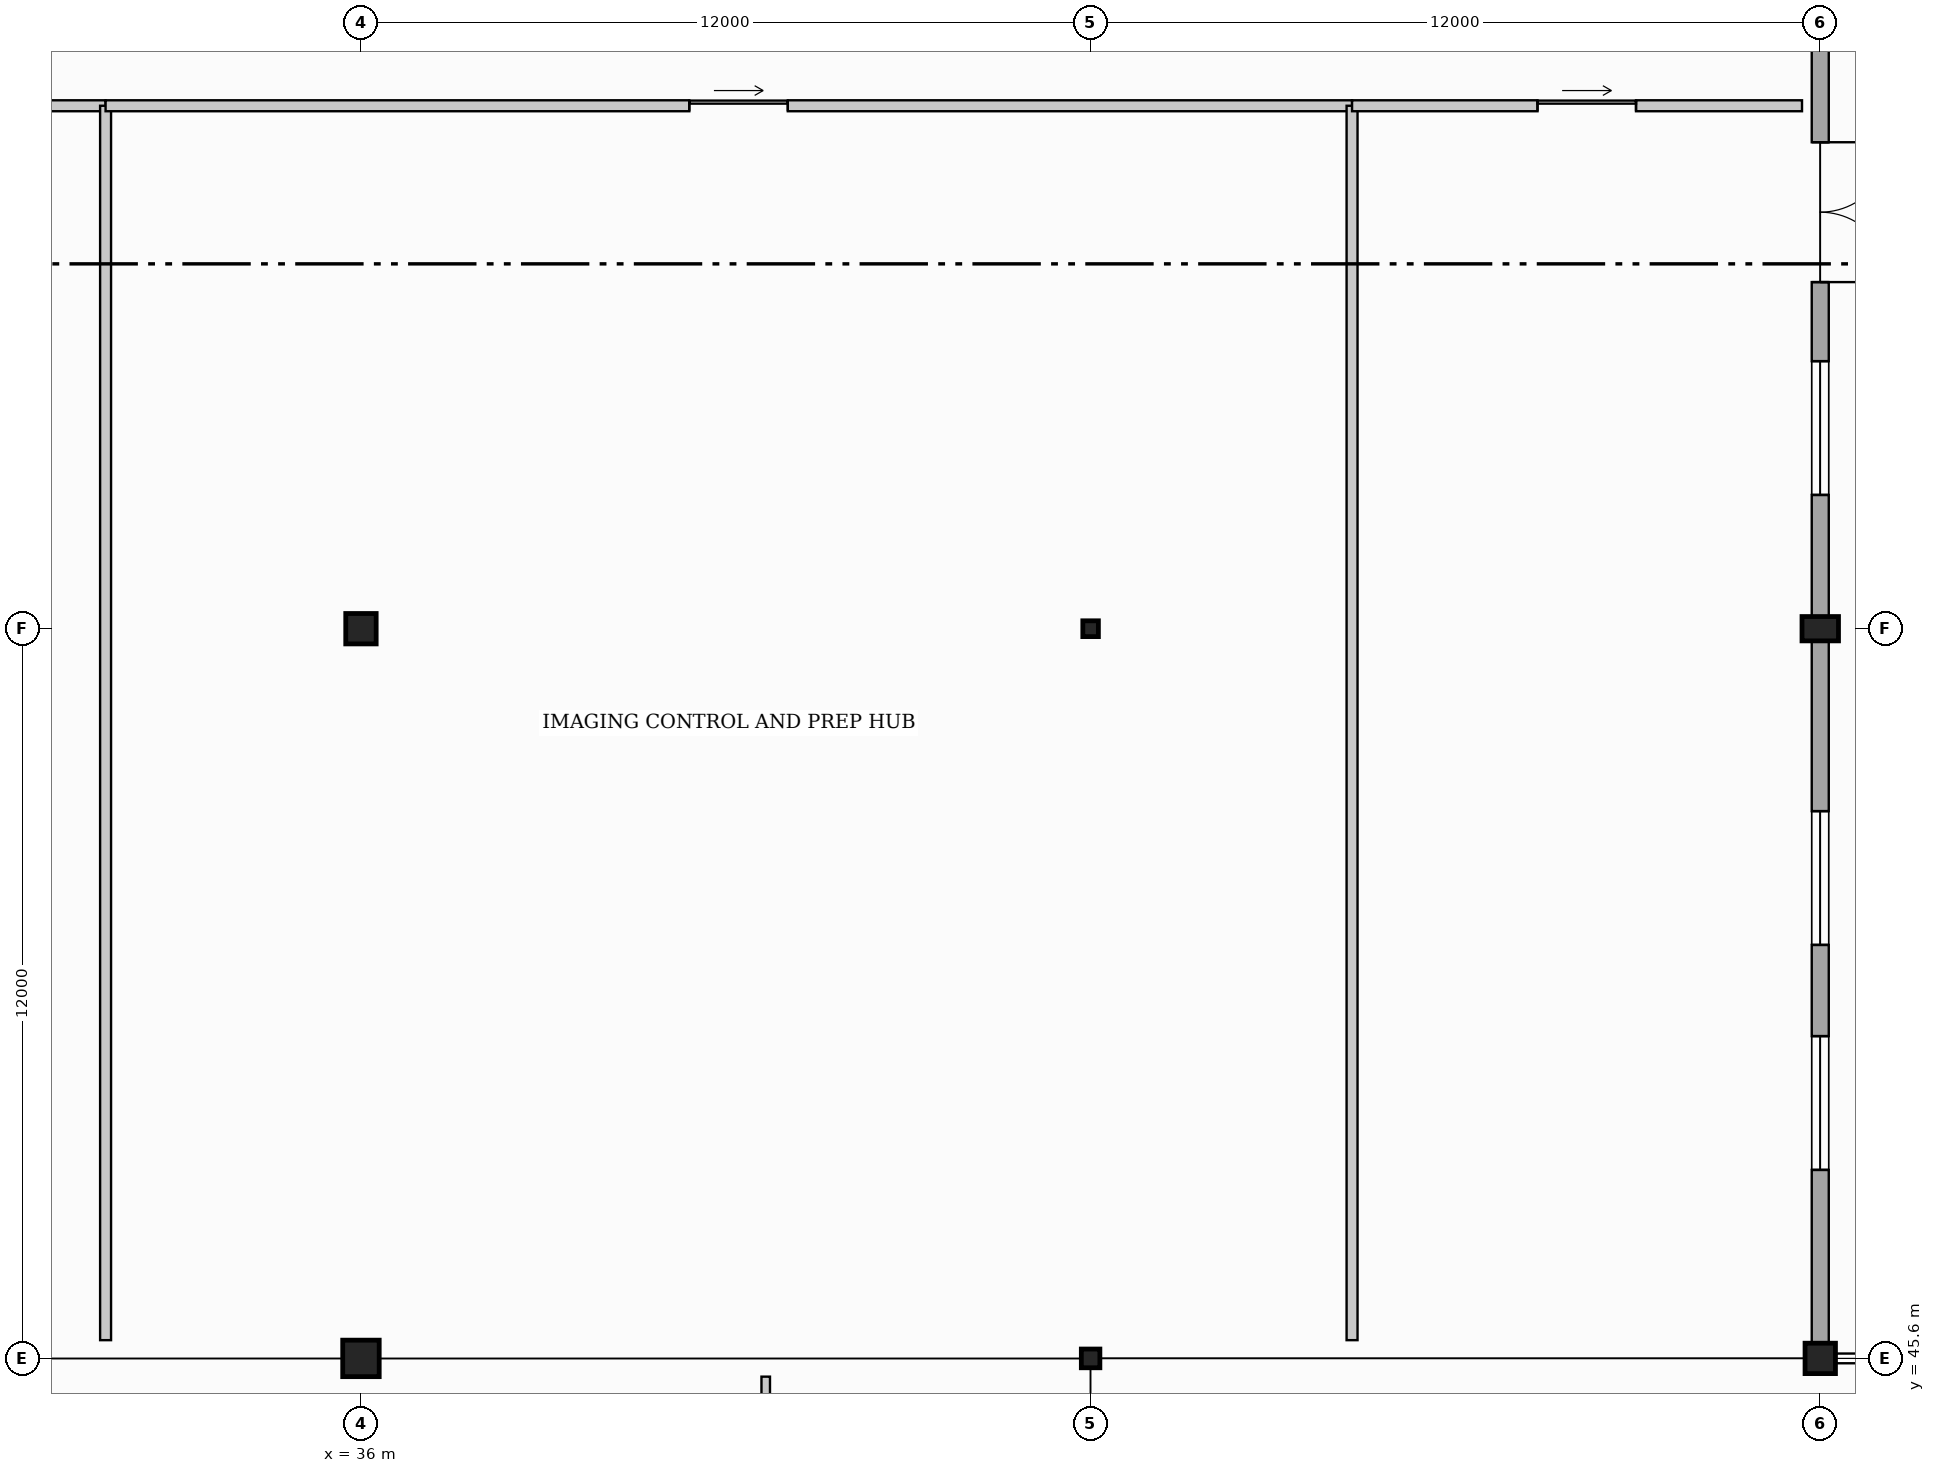
"""IFC4 building model, lengths in metres.
Left out: names, types, materials, properties, quantities, classifications, styles, units other than length and angle.
Written with IfcOpenShell. Run it as: python <this file> out.ifc"""

import sys

from ifc_helpers import new_model, si_unit, direction, frame, frame_2d, origin, origin_2d, place, context, subcontext, project, spatial, rectangle, i_section, extrude, element, fill, save


model = new_model("IFC4")
c1 = context("Model", 3, precision=1e-05, world=origin(), true_north=direction((0.0, 1.0)))
c2 = subcontext(c1, "Body", "Model", "MODEL_VIEW")
j1 = project(units=[si_unit("LENGTHUNIT", "METRE"), si_unit("PLANEANGLEUNIT", "RADIAN")], contexts=[c1])
p1 = place(None, origin())
s1 = spatial("IfcSite", under=j1, at=p1, CompositionType="ELEMENT")
p2 = place(p1, origin())
s2 = spatial("IfcBuilding", under=s1, at=p2, CompositionType="ELEMENT")
p3 = place(p2, origin())
s3 = spatial("IfcBuildingStorey", under=s2, at=p3, CompositionType="ELEMENT", Elevation=0.0)
p4 = place(p3, frame((36.0, 45.6, 0.0), z_axis=(0.0, 0.0, 1.0), x_axis=(0.0, 1.0, 0.0)))
e1 = element("IfcColumn", 1, at=p4, inside=s3, PredefinedType="COLUMN", context=c2, shape_type="SweptSolid", body=[
    extrude(rectangle(XDim=0.6, YDim=0.6, at=origin_2d()), origin(), (0.0, 0.0, 1.0), 4.8),
])
p5 = place(p3, frame((36.0, 57.6, 0.0), z_axis=(0.0, 0.0, 1.0), x_axis=(0.0, 1.0, 0.0)))
e2 = element("IfcColumn", 2, at=p5, inside=s3, PredefinedType="COLUMN", context=c2, shape_type="SweptSolid", body=[
    extrude(rectangle(XDim=0.5, YDim=0.5, at=origin_2d()), origin(), (0.0, 0.0, 1.0), 4.8),
])
p6 = place(p3, frame((48.0, 45.6, 0.0), z_axis=(0.0, 0.0, 1.0), x_axis=(1.0, 0.0, 0.0)))
e3 = element("IfcColumn", 3, at=p6, inside=s3, PredefinedType="COLUMN", context=c2, shape_type="SweptSolid", body=[
    extrude(i_section(OverallWidth=0.305, OverallDepth=0.308, WebThickness=0.01, FlangeThickness=0.015, at=origin_2d()), origin(), (0.0, 0.0, 1.0), 4.8),
])
p7 = place(p3, frame((48.0, 57.6, 0.0), z_axis=(0.0, 0.0, 1.0), x_axis=(1.0, 0.0, 0.0)))
e4 = element("IfcColumn", 4, at=p7, inside=s3, PredefinedType="COLUMN", context=c2, shape_type="SweptSolid", body=[
    extrude(i_section(OverallWidth=0.256, OverallDepth=0.26, WebThickness=0.01, FlangeThickness=0.017, at=origin_2d()), origin(), (0.0, 0.0, 1.0), 4.8),
])
p8 = place(p3, frame((60.0, 45.6, 0.0), z_axis=(0.0, 0.0, 1.0), x_axis=(0.0, 1.0, 0.0)))
e5 = element("IfcColumn", 5, at=p8, inside=s3, PredefinedType="COLUMN", context=c2, shape_type="SweptSolid", body=[
    extrude(rectangle(XDim=0.5, YDim=0.5, at=origin_2d()), origin(), (0.0, 0.0, 1.0), 4.8),
])
p9 = place(p3, frame((60.0, 57.6, 0.0), z_axis=(0.0, 0.0, 1.0), x_axis=(0.0, 1.0, 0.0)))
e6 = element("IfcColumn", 6, at=p9, inside=s3, PredefinedType="PILASTER", context=c2, shape_type="SweptSolid", body=[
    extrude(rectangle(XDim=0.4, YDim=0.6, at=origin_2d()), origin(), (0.0, 0.0, 1.0), 4.8),
])
p10 = place(p3, frame((60.0, 81.6, 0.0), z_axis=(0.0, 0.0, 1.0), x_axis=(0.0, -1.0, 0.0)))
e7 = element("IfcWall", 7, at=p10, inside=s3, PredefinedType="STANDARD", context=c2, shape_type="SweptSolid", body=[
    extrude(rectangle(XDim=36.0, YDim=0.28, at=frame_2d((18.0, 0.0))), origin(), (0.0, 0.0, 1.0), 3.48),
])
p11 = place(p10, frame((16.0, 0.0, 0.0)))
e8 = element("IfcOpeningElement", 8, at=p11, cuts=e7, PredefinedType="OPENING", context=c2, shape_type="SweptSolid", body=[
    extrude(rectangle(XDim=2.3, YDim=2.3, at=frame_2d((1.15, 1.15))), frame((0.0, 0.15, 0.0), z_axis=(0.0, -1.0, 0.0), x_axis=(1.0, 0.0, 0.0)), (0.0, 0.0, 1.0), 0.3),
])
p12 = place(p10, frame((1.1, 0.0, 0.95)))
e9 = element("IfcOpeningElement", 9, at=p12, cuts=e7, PredefinedType="OPENING", context=c2, shape_type="SweptSolid", body=[
    extrude(rectangle(XDim=2.2, YDim=1.6, at=frame_2d((1.1, 0.8))), frame((0.0, 0.15, 0.0), z_axis=(0.0, -1.0, 0.0), x_axis=(1.0, 0.0, 0.0)), (0.0, 0.0, 1.0), 0.3),
])
p13 = place(p10, frame((4.8, 0.0, 0.95)))
e10 = element("IfcOpeningElement", 10, at=p13, cuts=e7, PredefinedType="OPENING", context=c2, shape_type="SweptSolid", body=[
    extrude(rectangle(XDim=2.2, YDim=1.6, at=frame_2d((1.1, 0.8))), frame((0.0, 0.15, 0.0), z_axis=(0.0, -1.0, 0.0), x_axis=(1.0, 0.0, 0.0)), (0.0, 0.0, 1.0), 0.3),
])
p14 = place(p10, frame((8.5, 0.0, 0.95)))
e11 = element("IfcOpeningElement", 11, at=p14, cuts=e7, PredefinedType="OPENING", context=c2, shape_type="SweptSolid", body=[
    extrude(rectangle(XDim=2.2, YDim=1.6, at=frame_2d((1.1, 0.8))), frame((0.0, 0.15, 0.0), z_axis=(0.0, -1.0, 0.0), x_axis=(1.0, 0.0, 0.0)), (0.0, 0.0, 1.0), 0.3),
])
p15 = place(p10, frame((19.6, 0.0, 0.95)))
e12 = element("IfcOpeningElement", 12, at=p15, cuts=e7, PredefinedType="OPENING", context=c2, shape_type="SweptSolid", body=[
    extrude(rectangle(XDim=2.2, YDim=1.6, at=frame_2d((1.1, 0.8))), frame((0.0, 0.15, 0.0), z_axis=(0.0, -1.0, 0.0), x_axis=(1.0, 0.0, 0.0)), (0.0, 0.0, 1.0), 0.3),
])
p16 = place(p10, frame((27.0, 0.0, 0.95)))
e13 = element("IfcOpeningElement", 13, at=p16, cuts=e7, PredefinedType="OPENING", context=c2, shape_type="SweptSolid", body=[
    extrude(rectangle(XDim=2.2, YDim=1.6, at=frame_2d((1.1, 0.8))), frame((0.0, 0.15, 0.0), z_axis=(0.0, -1.0, 0.0), x_axis=(1.0, 0.0, 0.0)), (0.0, 0.0, 1.0), 0.3),
])
p17 = place(p10, frame((30.7, 0.0, 0.95)))
e14 = element("IfcOpeningElement", 14, at=p17, cuts=e7, PredefinedType="OPENING", context=c2, shape_type="SweptSolid", body=[
    extrude(rectangle(XDim=2.2, YDim=1.6, at=frame_2d((1.1, 0.8))), frame((0.0, 0.15, 0.0), z_axis=(0.0, -1.0, 0.0), x_axis=(1.0, 0.0, 0.0)), (0.0, 0.0, 1.0), 0.3),
])
p18 = place(p3, frame((42.657, 17.8, 0.0), z_axis=(0.0, 0.0, 1.0), x_axis=(0.0, 1.0, 0.0)))
e15 = element("IfcWall", 15, at=p18, inside=s3, PredefinedType="PARTITIONING", context=c2, shape_type="SweptSolid", body=[
    extrude(rectangle(XDim=27.5, YDim=0.14, at=frame_2d((13.75, 0.0))), origin(), (0.0, 0.0, 1.0), 3.897),
])
p19 = place(p3, frame((20.3, 66.2, 0.0), z_axis=(0.0, 0.0, 1.0), x_axis=(1.0, 0.0, 0.0)))
e16 = element("IfcWall", 16, at=p19, inside=s3, PredefinedType="PARTITIONING", context=c2, shape_type="SweptSolid", body=[
    extrude(rectangle(XDim=11.5, YDim=0.18, at=frame_2d((5.75, 0.0))), origin(), (0.0, 0.0, 1.0), 3.48),
])
p20 = place(p19, frame((5.1, 0.0, 0.0)))
e17 = element("IfcOpeningElement", 17, at=p20, cuts=e16, PredefinedType="OPENING", context=c2, shape_type="SweptSolid", body=[
    extrude(rectangle(XDim=1.62, YDim=2.3, at=frame_2d((0.81, 1.15))), frame((0.0, 0.1, 0.0), z_axis=(0.0, -1.0, 0.0), x_axis=(1.0, 0.0, 0.0)), (0.0, 0.0, 1.0), 0.2),
])
p21 = place(p3, frame((31.8, 45.9, 0.0), z_axis=(0.0, 0.0, 1.0), x_axis=(0.0, 1.0, 0.0)))
e18 = element("IfcWall", 18, at=p21, inside=s3, PredefinedType="PARTITIONING", context=c2, shape_type="SweptSolid", body=[
    extrude(rectangle(XDim=20.3, YDim=0.18, at=frame_2d((10.15, 0.0))), origin(), (0.0, 0.0, 1.0), 3.902),
])
p22 = place(p3, frame((31.8, 66.2, 0.0), z_axis=(0.0, 0.0, 1.0), x_axis=(1.0, 0.0, 0.0)))
e19 = element("IfcWall", 19, at=p22, inside=s3, PredefinedType="PARTITIONING", context=c2, shape_type="SweptSolid", body=[
    extrude(rectangle(XDim=20.5, YDim=0.18, at=frame_2d((10.25, 0.0))), origin(), (0.0, 0.0, 1.0), 3.53),
])
p23 = place(p22, frame((9.6, 0.0, 0.0)))
e20 = element("IfcOpeningElement", 20, at=p23, cuts=e19, PredefinedType="OPENING", context=c2, shape_type="SweptSolid", body=[
    extrude(rectangle(XDim=1.62, YDim=2.3, at=frame_2d((0.81, 1.15))), frame((0.0, 0.1, 0.0), z_axis=(0.0, -1.0, 0.0), x_axis=(1.0, 0.0, 0.0)), (0.0, 0.0, 1.0), 0.2),
])
p24 = place(p3, frame((52.3, 45.9, 0.0), z_axis=(0.0, 0.0, 1.0), x_axis=(0.0, 1.0, 0.0)))
e21 = element("IfcWall", 21, at=p24, inside=s3, PredefinedType="PARTITIONING", context=c2, shape_type="SweptSolid", body=[
    extrude(rectangle(XDim=20.3, YDim=0.18, at=frame_2d((10.15, 0.0))), origin(), (0.0, 0.0, 1.0), 3.973),
])
p25 = place(p3, frame((52.3, 66.2, 0.0), z_axis=(0.0, 0.0, 1.0), x_axis=(1.0, 0.0, 0.0)))
e22 = element("IfcWall", 22, at=p25, inside=s3, PredefinedType="PARTITIONING", context=c2, shape_type="SweptSolid", body=[
    extrude(rectangle(XDim=7.4, YDim=0.18, at=frame_2d((3.7, 0.0))), origin(), (0.0, 0.0, 1.0), 3.78),
])
p26 = place(p25, frame((3.05, 0.0, 0.0)))
e23 = element("IfcOpeningElement", 23, at=p26, cuts=e22, PredefinedType="OPENING", context=c2, shape_type="SweptSolid", body=[
    extrude(rectangle(XDim=1.62, YDim=2.3, at=frame_2d((0.81, 1.15))), frame((0.0, 0.1, 0.0), z_axis=(0.0, -1.0, 0.0), x_axis=(1.0, 0.0, 0.0)), (0.0, 0.0, 1.0), 0.2),
])
p27 = place(p11, origin())
e24 = element("IfcDoor", 24, at=p27, inside=s3, OperationType="DOUBLE_DOOR_SINGLE_SWING", PredefinedType="DOOR", context=c2, shape_type="SweptSolid", body=[
    extrude(rectangle(XDim=2.3, YDim=2.3, at=frame_2d((1.15, 1.15))), frame((0.0, 0.025, 0.0), z_axis=(0.0, -1.0, 0.0), x_axis=(1.0, 0.0, 0.0)), (0.0, 0.0, 1.0), 0.05),
])
fill(e8, e24)
p28 = place(p15, origin())
e25 = element("IfcWindow", 25, at=p28, inside=s3, PartitioningType="DOUBLE_PANEL_VERTICAL", PredefinedType="WINDOW", context=c2, shape_type="SweptSolid", body=[
    extrude(rectangle(XDim=2.2, YDim=1.6, at=frame_2d((1.1, 0.8))), frame((0.0, 0.03, 0.0), z_axis=(0.0, -1.0, 0.0), x_axis=(1.0, 0.0, 0.0)), (0.0, 0.0, 1.0), 0.06),
])
fill(e12, e25)
p29 = place(p16, origin())
e26 = element("IfcWindow", 26, at=p29, inside=s3, PartitioningType="DOUBLE_PANEL_VERTICAL", PredefinedType="WINDOW", context=c2, shape_type="SweptSolid", body=[
    extrude(rectangle(XDim=2.2, YDim=1.6, at=frame_2d((1.1, 0.8))), frame((0.0, 0.03, 0.0), z_axis=(0.0, -1.0, 0.0), x_axis=(1.0, 0.0, 0.0)), (0.0, 0.0, 1.0), 0.06),
])
fill(e13, e26)
p30 = place(p17, origin())
e27 = element("IfcWindow", 27, at=p30, inside=s3, PartitioningType="DOUBLE_PANEL_VERTICAL", PredefinedType="WINDOW", context=c2, shape_type="SweptSolid", body=[
    extrude(rectangle(XDim=2.2, YDim=1.6, at=frame_2d((1.1, 0.8))), frame((0.0, 0.03, 0.0), z_axis=(0.0, -1.0, 0.0), x_axis=(1.0, 0.0, 0.0)), (0.0, 0.0, 1.0), 0.06),
])
fill(e14, e27)
p31 = place(p23, origin())
e28 = element("IfcDoor", 28, at=p31, inside=s3, OperationType="SLIDING_TO_RIGHT", PredefinedType="DOOR", context=c2, shape_type="SweptSolid", body=[
    extrude(rectangle(XDim=1.62, YDim=2.3, at=frame_2d((0.81, 1.15))), frame((0.0, 0.025, 0.0), z_axis=(0.0, -1.0, 0.0), x_axis=(1.0, 0.0, 0.0)), (0.0, 0.0, 1.0), 0.05),
])
fill(e20, e28)
p32 = place(p26, origin())
e29 = element("IfcDoor", 29, at=p32, inside=s3, OperationType="SLIDING_TO_RIGHT", PredefinedType="DOOR", context=c2, shape_type="SweptSolid", body=[
    extrude(rectangle(XDim=1.62, YDim=2.3, at=frame_2d((0.81, 1.15))), frame((0.0, 0.025, 0.0), z_axis=(0.0, -1.0, 0.0), x_axis=(1.0, 0.0, 0.0)), (0.0, 0.0, 1.0), 0.05),
])
fill(e23, e29)
save(model, sys.argv[1])
